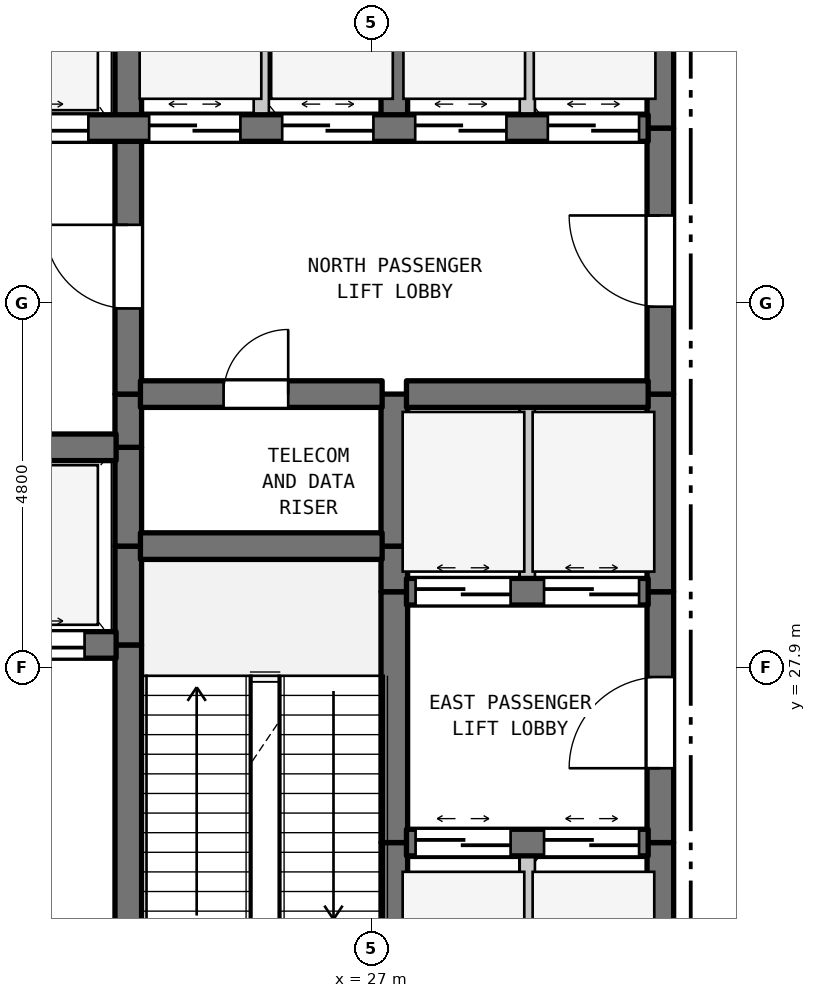
"""IFC4 building model, lengths in metres.
Left out: names, types, materials, properties, quantities, classifications, styles, units other than length and angle.
Written with IfcOpenShell. Run it as: python <this file> out.ifc"""

import sys

from ifc_helpers import new_model, si_unit, direction, frame, frame_2d, origin, place, context, subcontext, project, spatial, rectangle, extrude, element, fill, save


model = new_model("IFC4")
c1 = context("Model", 3, precision=1e-05, world=origin(), true_north=direction((0.0, 1.0)))
c2 = subcontext(c1, "Body", "Model", "MODEL_VIEW")
j1 = project(units=[si_unit("LENGTHUNIT", "METRE"), si_unit("PLANEANGLEUNIT", "RADIAN")], contexts=[c1])
p1 = place(None, origin())
s1 = spatial("IfcSite", under=j1, at=p1, CompositionType="ELEMENT")
p2 = place(p1, origin())
s2 = spatial("IfcBuilding", under=s1, at=p2, CompositionType="ELEMENT")
p3 = place(p2, frame((0.0, 0.0, 81.2)))
s3 = spatial("IfcBuildingStorey", under=s2, at=p3, CompositionType="ELEMENT", Elevation=81.2)
p4 = place(p3, frame((23.8, 22.7, 0.0), z_axis=(0.0, 0.0, 1.0), x_axis=(0.0, 1.0, 0.0)))
e1 = element("IfcWall", 1, at=p4, inside=s3, PredefinedType="SHEAR", context=c2, shape_type="SweptSolid", body=[
    extrude(rectangle(XDim=5.5, YDim=0.35, at=frame_2d((2.75, 0.0))), origin(), (0.0, 0.0, 1.0), 4.885),
])
p5 = place(p4, frame((0.235, 0.0, 0.0)))
e2 = element("IfcOpeningElement", 2, at=p5, cuts=e1, PredefinedType="OPENING", context=c2, shape_type="SweptSolid", body=[
    extrude(rectangle(XDim=1.1, YDim=2.15, at=frame_2d((0.55, 1.075))), frame((0.0, 0.185, 0.0), z_axis=(0.0, -1.0, 0.0), x_axis=(1.0, 0.0, 0.0)), (0.0, 0.0, 1.0), 0.37),
])
for number, where, z_axis, x_axis in (
    (3, (23.8, 28.2, 0.0), (0.0, 0.0, 1.0), (0.0, 1.0, 0.0)),
    (4, (23.8, 29.5, 0.0), (0.0, 0.0, 1.0), (0.0, 1.0, 0.0)),
):
    element("IfcWall", number, at=place(p3, frame(where, z_axis=z_axis, x_axis=x_axis)), inside=s3, PredefinedType="SHEAR", context=c2, shape_type="SweptSolid", body=[
        extrude(rectangle(XDim=1.3, YDim=0.35, at=frame_2d((0.65, 0.0))), origin(), (0.0, 0.0, 1.0), 4.885),
    ])
p6 = place(p3, frame((23.8, 30.8, 0.0), z_axis=(0.0, 0.0, 1.0), x_axis=(0.0, 1.0, 0.0)))
e5 = element("IfcWall", 5, at=p6, inside=s3, PredefinedType="SHEAR", context=c2, shape_type="SweptSolid", body=[
    extrude(rectangle(XDim=0.7, YDim=0.35, at=frame_2d((0.35, 0.0))), origin(), (0.0, 0.0, 1.0), 4.885),
])
p7 = place(p3, frame((23.8, 31.5, 0.0), z_axis=(0.0, 0.0, 1.0), x_axis=(0.0, 1.0, 0.0)))
e6 = element("IfcWall", 6, at=p7, inside=s3, PredefinedType="SHEAR", context=c2, shape_type="SweptSolid", body=[
    extrude(rectangle(XDim=3.5, YDim=0.35, at=frame_2d((1.75, 0.0))), origin(), (0.0, 0.0, 1.0), 4.885),
])
p8 = place(p7, frame((1.127, 0.0, 0.0)))
e7 = element("IfcOpeningElement", 7, at=p8, cuts=e6, PredefinedType="OPENING", context=c2, shape_type="SweptSolid", body=[
    extrude(rectangle(XDim=1.1, YDim=2.15, at=frame_2d((0.55, 1.075))), frame((0.0, 0.185, 0.0), z_axis=(0.0, -1.0, 0.0), x_axis=(1.0, 0.0, 0.0)), (0.0, 0.0, 1.0), 0.37),
])
p9 = place(p3, frame((23.8, 35.0, 0.0), z_axis=(0.0, 0.0, 1.0), x_axis=(0.0, 1.0, 0.0)))
e8 = element("IfcWall", 8, at=p9, inside=s3, PredefinedType="SHEAR", context=c2, shape_type="SweptSolid", body=[
    extrude(rectangle(XDim=2.9, YDim=0.35, at=frame_2d((1.45, 0.0))), origin(), (0.0, 0.0, 1.0), 4.885),
])
p10 = place(p3, frame((25.55, 35.0, 0.0), z_axis=(0.0, 0.0, 1.0), x_axis=(0.0, 1.0, 0.0)))
e9 = element("IfcWall", 9, at=p10, inside=s3, PredefinedType="STANDARD", context=c2, shape_type="SweptSolid", body=[
    extrude(rectangle(XDim=2.9, YDim=0.2, at=frame_2d((1.45, 0.0))), origin(), (0.0, 0.0, 1.0), 4.885),
])
p11 = place(p3, frame((27.3, 22.7, 0.0), z_axis=(0.0, 0.0, 1.0), x_axis=(0.0, 1.0, 0.0)))
e10 = element("IfcWall", 10, at=p11, inside=s3, PredefinedType="SHEAR", context=c2, shape_type="SweptSolid", body=[
    extrude(rectangle(XDim=2.9, YDim=0.35, at=frame_2d((1.45, 0.0))), origin(), (0.0, 0.0, 1.0), 4.885),
])
p12 = place(p3, frame((27.3, 25.6, 0.0), z_axis=(0.0, 0.0, 1.0), x_axis=(0.0, 1.0, 0.0)))
e11 = element("IfcWall", 11, at=p12, inside=s3, PredefinedType="SHEAR", context=c2, shape_type="SweptSolid", body=[
    extrude(rectangle(XDim=3.3, YDim=0.35, at=frame_2d((1.65, 0.0))), origin(), (0.0, 0.0, 1.0), 4.885),
])
p13 = place(p3, frame((27.3, 28.9, 0.0), z_axis=(0.0, 0.0, 1.0), x_axis=(0.0, 1.0, 0.0)))
e12 = element("IfcWall", 12, at=p13, inside=s3, PredefinedType="SHEAR", context=c2, shape_type="SweptSolid", body=[
    extrude(rectangle(XDim=0.6, YDim=0.35, at=frame_2d((0.3, 0.0))), origin(), (0.0, 0.0, 1.0), 4.885),
])
p14 = place(p3, frame((27.3, 29.5, 0.0), z_axis=(0.0, 0.0, 1.0), x_axis=(0.0, 1.0, 0.0)))
e13 = element("IfcWall", 13, at=p14, inside=s3, PredefinedType="SHEAR", context=c2, shape_type="SweptSolid", body=[
    extrude(rectangle(XDim=2.0, YDim=0.35, at=frame_2d((1.0, 0.0))), origin(), (0.0, 0.0, 1.0), 4.885),
])
p15 = place(p3, frame((27.3, 35.0, 0.0), z_axis=(0.0, 0.0, 1.0), x_axis=(0.0, 1.0, 0.0)))
e14 = element("IfcWall", 14, at=p15, inside=s3, PredefinedType="SHEAR", context=c2, shape_type="SweptSolid", body=[
    extrude(rectangle(XDim=2.9, YDim=0.35, at=frame_2d((1.45, 0.0))), origin(), (0.0, 0.0, 1.0), 4.885),
])
p16 = place(p3, frame((29.05, 22.7, 0.0), z_axis=(0.0, 0.0, 1.0), x_axis=(0.0, 1.0, 0.0)))
e15 = element("IfcWall", 15, at=p16, inside=s3, PredefinedType="STANDARD", context=c2, shape_type="SweptSolid", body=[
    extrude(rectangle(XDim=2.9, YDim=0.2, at=frame_2d((1.45, 0.0))), origin(), (0.0, 0.0, 1.0), 4.885),
])
p17 = place(p3, frame((29.05, 28.9, 0.0), z_axis=(0.0, 0.0, 1.0), x_axis=(0.0, 1.0, 0.0)))
e16 = element("IfcWall", 16, at=p17, inside=s3, PredefinedType="STANDARD", context=c2, shape_type="SweptSolid", body=[
    extrude(rectangle(XDim=2.6, YDim=0.2, at=frame_2d((1.3, 0.0))), origin(), (0.0, 0.0, 1.0), 4.885),
])
p18 = place(p3, frame((29.05, 35.0, 0.0), z_axis=(0.0, 0.0, 1.0), x_axis=(0.0, 1.0, 0.0)))
e17 = element("IfcWall", 17, at=p18, inside=s3, PredefinedType="STANDARD", context=c2, shape_type="SweptSolid", body=[
    extrude(rectangle(XDim=2.9, YDim=0.2, at=frame_2d((1.45, 0.0))), origin(), (0.0, 0.0, 1.0), 4.885),
])
p19 = place(p3, frame((30.8, 22.7, 0.0), z_axis=(0.0, 0.0, 1.0), x_axis=(0.0, 1.0, 0.0)))
e18 = element("IfcWall", 18, at=p19, inside=s3, PredefinedType="SHEAR", context=c2, shape_type="SweptSolid", body=[
    extrude(rectangle(XDim=2.9, YDim=0.35, at=frame_2d((1.45, 0.0))), origin(), (0.0, 0.0, 1.0), 4.885),
])
p20 = place(p3, frame((30.8, 25.6, 0.0), z_axis=(0.0, 0.0, 1.0), x_axis=(0.0, 1.0, 0.0)))
e19 = element("IfcWall", 19, at=p20, inside=s3, PredefinedType="SHEAR", context=c2, shape_type="SweptSolid", body=[
    extrude(rectangle(XDim=3.3, YDim=0.35, at=frame_2d((1.65, 0.0))), origin(), (0.0, 0.0, 1.0), 4.885),
])
p21 = place(p20, frame((0.978, 0.0, 0.0)))
e20 = element("IfcOpeningElement", 20, at=p21, cuts=e19, PredefinedType="OPENING", context=c2, shape_type="SweptSolid", body=[
    extrude(rectangle(XDim=1.2, YDim=2.2, at=frame_2d((0.6, 1.1))), frame((0.0, 0.185, 0.0), z_axis=(0.0, -1.0, 0.0), x_axis=(1.0, 0.0, 0.0)), (0.0, 0.0, 1.0), 0.37),
])
p22 = place(p3, frame((30.8, 28.9, 0.0), z_axis=(0.0, 0.0, 1.0), x_axis=(0.0, 1.0, 0.0)))
e21 = element("IfcWall", 21, at=p22, inside=s3, PredefinedType="SHEAR", context=c2, shape_type="SweptSolid", body=[
    extrude(rectangle(XDim=2.6, YDim=0.35, at=frame_2d((1.3, 0.0))), origin(), (0.0, 0.0, 1.0), 4.885),
])
p23 = place(p3, frame((30.8, 31.5, 0.0), z_axis=(0.0, 0.0, 1.0), x_axis=(0.0, 1.0, 0.0)))
e22 = element("IfcWall", 22, at=p23, inside=s3, PredefinedType="SHEAR", context=c2, shape_type="SweptSolid", body=[
    extrude(rectangle(XDim=3.5, YDim=0.35, at=frame_2d((1.75, 0.0))), origin(), (0.0, 0.0, 1.0), 4.885),
])
p24 = place(p23, frame((1.15, 0.0, 0.0)))
e23 = element("IfcOpeningElement", 23, at=p24, cuts=e22, PredefinedType="OPENING", context=c2, shape_type="SweptSolid", body=[
    extrude(rectangle(XDim=1.2, YDim=2.2, at=frame_2d((0.6, 1.1))), frame((0.0, 0.185, 0.0), z_axis=(0.0, -1.0, 0.0), x_axis=(1.0, 0.0, 0.0)), (0.0, 0.0, 1.0), 0.37),
])
p25 = place(p3, frame((30.8, 35.0, 0.0), z_axis=(0.0, 0.0, 1.0), x_axis=(0.0, 1.0, 0.0)))
e24 = element("IfcWall", 24, at=p25, inside=s3, PredefinedType="SHEAR", context=c2, shape_type="SweptSolid", body=[
    extrude(rectangle(XDim=2.9, YDim=0.35, at=frame_2d((1.45, 0.0))), origin(), (0.0, 0.0, 1.0), 4.885),
])
p26 = place(p3, frame((27.46, 25.6, 0.0), z_axis=(0.0, 0.0, 1.0), x_axis=(1.0, 0.0, 0.0)))
e25 = element("IfcWall", 25, at=p26, inside=s3, PredefinedType="SHEAR", context=c2, shape_type="SweptSolid", body=[
    extrude(rectangle(XDim=3.18, YDim=0.35, at=frame_2d((1.59, 0.0))), origin(), (0.0, 0.0, 1.0), 4.885),
])
p27 = place(p26, frame((0.12, 0.0, 0.0)))
e26 = element("IfcOpeningElement", 26, at=p27, cuts=e25, PredefinedType="OPENING", context=c2, shape_type="SweptSolid", body=[
    extrude(rectangle(XDim=1.25, YDim=2.2, at=frame_2d((0.625, 1.1))), frame((0.0, 0.185, 0.0), z_axis=(0.0, -1.0, 0.0), x_axis=(1.0, 0.0, 0.0)), (0.0, 0.0, 1.0), 0.37),
])
p28 = place(p26, frame((1.81, 0.0, 0.0)))
e27 = element("IfcOpeningElement", 27, at=p28, cuts=e25, PredefinedType="OPENING", context=c2, shape_type="SweptSolid", body=[
    extrude(rectangle(XDim=1.25, YDim=2.2, at=frame_2d((0.625, 1.1))), frame((0.0, 0.185, 0.0), z_axis=(0.0, -1.0, 0.0), x_axis=(1.0, 0.0, 0.0)), (0.0, 0.0, 1.0), 0.37),
])
p29 = place(p3, frame((19.16, 28.2, 0.0), z_axis=(0.0, 0.0, 1.0), x_axis=(1.0, 0.0, 0.0)))
e28 = element("IfcWall", 28, at=p29, inside=s3, PredefinedType="SHEAR", context=c2, shape_type="SweptSolid", body=[
    extrude(rectangle(XDim=4.48, YDim=0.35, at=frame_2d((2.24, 0.0))), origin(), (0.0, 0.0, 1.0), 4.885),
])
p30 = place(p29, frame((0.415, 0.0, 0.0)))
e29 = element("IfcOpeningElement", 29, at=p30, cuts=e28, PredefinedType="OPENING", context=c2, shape_type="SweptSolid", body=[
    extrude(rectangle(XDim=1.25, YDim=2.2, at=frame_2d((0.625, 1.1))), frame((0.0, 0.185, 0.0), z_axis=(0.0, -1.0, 0.0), x_axis=(1.0, 0.0, 0.0)), (0.0, 0.0, 1.0), 0.37),
])
p31 = place(p29, frame((2.815, 0.0, 0.0)))
e30 = element("IfcOpeningElement", 30, at=p31, cuts=e28, PredefinedType="OPENING", context=c2, shape_type="SweptSolid", body=[
    extrude(rectangle(XDim=1.25, YDim=2.2, at=frame_2d((0.625, 1.1))), frame((0.0, 0.185, 0.0), z_axis=(0.0, -1.0, 0.0), x_axis=(1.0, 0.0, 0.0)), (0.0, 0.0, 1.0), 0.37),
])
p32 = place(p3, frame((27.46, 28.9, 0.0), z_axis=(0.0, 0.0, 1.0), x_axis=(1.0, 0.0, 0.0)))
e31 = element("IfcWall", 31, at=p32, inside=s3, PredefinedType="SHEAR", context=c2, shape_type="SweptSolid", body=[
    extrude(rectangle(XDim=3.18, YDim=0.35, at=frame_2d((1.59, 0.0))), origin(), (0.0, 0.0, 1.0), 4.885),
])
p33 = place(p32, frame((0.12, 0.0, 0.0)))
e32 = element("IfcOpeningElement", 32, at=p33, cuts=e31, PredefinedType="OPENING", context=c2, shape_type="SweptSolid", body=[
    extrude(rectangle(XDim=1.25, YDim=2.2, at=frame_2d((0.625, 1.1))), frame((0.0, 0.185, 0.0), z_axis=(0.0, -1.0, 0.0), x_axis=(1.0, 0.0, 0.0)), (0.0, 0.0, 1.0), 0.37),
])
p34 = place(p32, frame((1.81, 0.0, 0.0)))
e33 = element("IfcOpeningElement", 33, at=p34, cuts=e31, PredefinedType="OPENING", context=c2, shape_type="SweptSolid", body=[
    extrude(rectangle(XDim=1.25, YDim=2.2, at=frame_2d((0.625, 1.1))), frame((0.0, 0.185, 0.0), z_axis=(0.0, -1.0, 0.0), x_axis=(1.0, 0.0, 0.0)), (0.0, 0.0, 1.0), 0.37),
])
p35 = place(p3, frame((23.96, 29.5, 0.0), z_axis=(0.0, 0.0, 1.0), x_axis=(1.0, 0.0, 0.0)))
e34 = element("IfcWall", 34, at=p35, inside=s3, PredefinedType="SHEAR", context=c2, shape_type="SweptSolid", body=[
    extrude(rectangle(XDim=3.18, YDim=0.35, at=frame_2d((1.59, 0.0))), origin(), (0.0, 0.0, 1.0), 4.885),
])
p36 = place(p3, frame((19.16, 30.8, 0.0), z_axis=(0.0, 0.0, 1.0), x_axis=(1.0, 0.0, 0.0)))
e35 = element("IfcWall", 35, at=p36, inside=s3, PredefinedType="SHEAR", context=c2, shape_type="SweptSolid", body=[
    extrude(rectangle(XDim=4.48, YDim=0.35, at=frame_2d((2.24, 0.0))), origin(), (0.0, 0.0, 1.0), 4.885),
])
p37 = place(p3, frame((23.96, 31.5, 0.0), z_axis=(0.0, 0.0, 1.0), x_axis=(1.0, 0.0, 0.0)))
e36 = element("IfcWall", 36, at=p37, inside=s3, PredefinedType="SHEAR", context=c2, shape_type="SweptSolid", body=[
    extrude(rectangle(XDim=3.18, YDim=0.35, at=frame_2d((1.59, 0.0))), origin(), (0.0, 0.0, 1.0), 4.885),
])
p38 = place(p37, frame((1.094, 0.0, 0.0)))
e37 = element("IfcOpeningElement", 37, at=p38, cuts=e36, PredefinedType="OPENING", context=c2, shape_type="SweptSolid", body=[
    extrude(rectangle(XDim=0.85, YDim=2.1, at=frame_2d((0.425, 1.05))), frame((0.0, 0.185, 0.0), z_axis=(0.0, -1.0, 0.0), x_axis=(1.0, 0.0, 0.0)), (0.0, 0.0, 1.0), 0.37),
])
p39 = place(p3, frame((27.46, 31.5, 0.0), z_axis=(0.0, 0.0, 1.0), x_axis=(1.0, 0.0, 0.0)))
e38 = element("IfcWall", 38, at=p39, inside=s3, PredefinedType="SHEAR", context=c2, shape_type="SweptSolid", body=[
    extrude(rectangle(XDim=3.18, YDim=0.35, at=frame_2d((1.59, 0.0))), origin(), (0.0, 0.0, 1.0), 4.885),
])
p40 = place(p3, frame((19.16, 35.0, 0.0), z_axis=(0.0, 0.0, 1.0), x_axis=(1.0, 0.0, 0.0)))
e39 = element("IfcWall", 39, at=p40, inside=s3, PredefinedType="SHEAR", context=c2, shape_type="SweptSolid", body=[
    extrude(rectangle(XDim=11.48, YDim=0.35, at=frame_2d((5.74, 0.0))), origin(), (0.0, 0.0, 1.0), 4.885),
])
p41 = place(p40, frame((0.365, 0.0, 0.0)))
e40 = element("IfcOpeningElement", 40, at=p41, cuts=e39, PredefinedType="OPENING", context=c2, shape_type="SweptSolid", body=[
    extrude(rectangle(XDim=1.35, YDim=2.2, at=frame_2d((0.675, 1.1))), frame((0.0, 0.185, 0.0), z_axis=(0.0, -1.0, 0.0), x_axis=(1.0, 0.0, 0.0)), (0.0, 0.0, 1.0), 0.37),
])
p42 = place(p40, frame((2.765, 0.0, 0.0)))
e41 = element("IfcOpeningElement", 41, at=p42, cuts=e39, PredefinedType="OPENING", context=c2, shape_type="SweptSolid", body=[
    extrude(rectangle(XDim=1.35, YDim=2.2, at=frame_2d((0.675, 1.1))), frame((0.0, 0.185, 0.0), z_axis=(0.0, -1.0, 0.0), x_axis=(1.0, 0.0, 0.0)), (0.0, 0.0, 1.0), 0.37),
])
p43 = place(p40, frame((4.915, 0.0, 0.0)))
e42 = element("IfcOpeningElement", 42, at=p43, cuts=e39, PredefinedType="OPENING", context=c2, shape_type="SweptSolid", body=[
    extrude(rectangle(XDim=1.2, YDim=2.2, at=frame_2d((0.6, 1.1))), frame((0.0, 0.185, 0.0), z_axis=(0.0, -1.0, 0.0), x_axis=(1.0, 0.0, 0.0)), (0.0, 0.0, 1.0), 0.37),
])
p44 = place(p40, frame((6.665, 0.0, 0.0)))
e43 = element("IfcOpeningElement", 43, at=p44, cuts=e39, PredefinedType="OPENING", context=c2, shape_type="SweptSolid", body=[
    extrude(rectangle(XDim=1.2, YDim=2.2, at=frame_2d((0.6, 1.1))), frame((0.0, 0.185, 0.0), z_axis=(0.0, -1.0, 0.0), x_axis=(1.0, 0.0, 0.0)), (0.0, 0.0, 1.0), 0.37),
])
p45 = place(p40, frame((8.415, 0.0, 0.0)))
e44 = element("IfcOpeningElement", 44, at=p45, cuts=e39, PredefinedType="OPENING", context=c2, shape_type="SweptSolid", body=[
    extrude(rectangle(XDim=1.2, YDim=2.2, at=frame_2d((0.6, 1.1))), frame((0.0, 0.185, 0.0), z_axis=(0.0, -1.0, 0.0), x_axis=(1.0, 0.0, 0.0)), (0.0, 0.0, 1.0), 0.37),
])
p46 = place(p40, frame((10.16, 0.0, 0.0)))
e45 = element("IfcOpeningElement", 45, at=p46, cuts=e39, PredefinedType="OPENING", context=c2, shape_type="SweptSolid", body=[
    extrude(rectangle(XDim=1.2, YDim=2.2, at=frame_2d((0.6, 1.1))), frame((0.0, 0.185, 0.0), z_axis=(0.0, -1.0, 0.0), x_axis=(1.0, 0.0, 0.0)), (0.0, 0.0, 1.0), 0.37),
])
p47 = place(p8, origin())
e46 = element("IfcDoor", 46, at=p47, inside=s3, OperationType="SINGLE_SWING_RIGHT", PredefinedType="DOOR", context=c2, shape_type="SweptSolid", body=[
    extrude(rectangle(XDim=1.1, YDim=2.15, at=frame_2d((0.55, 1.075))), frame((0.0, 0.025, 0.0), z_axis=(0.0, -1.0, 0.0), x_axis=(1.0, 0.0, 0.0)), (0.0, 0.0, 1.0), 0.05),
])
fill(e7, e46)
p48 = place(p21, origin())
e47 = element("IfcDoor", 47, at=p48, inside=s3, OperationType="SINGLE_SWING_LEFT", PredefinedType="DOOR", context=c2, shape_type="SweptSolid", body=[
    extrude(rectangle(XDim=1.2, YDim=2.2, at=frame_2d((0.6, 1.1))), frame((0.0, 0.025, 0.0), z_axis=(0.0, -1.0, 0.0), x_axis=(1.0, 0.0, 0.0)), (0.0, 0.0, 1.0), 0.05),
])
fill(e20, e47)
p49 = place(p24, origin())
e48 = element("IfcDoor", 48, at=p49, inside=s3, OperationType="SINGLE_SWING_RIGHT", PredefinedType="DOOR", context=c2, shape_type="SweptSolid", body=[
    extrude(rectangle(XDim=1.2, YDim=2.2, at=frame_2d((0.6, 1.1))), frame((0.0, 0.025, 0.0), z_axis=(0.0, -1.0, 0.0), x_axis=(1.0, 0.0, 0.0)), (0.0, 0.0, 1.0), 0.05),
])
fill(e23, e48)
p50 = place(p27, origin())
e49 = element("IfcDoor", 49, at=p50, inside=s3, OperationType="DOUBLE_DOOR_SLIDING", PredefinedType="DOOR", context=c2, shape_type="SweptSolid", body=[
    extrude(rectangle(XDim=1.25, YDim=2.2, at=frame_2d((0.625, 1.1))), frame((0.0, 0.025, 0.0), z_axis=(0.0, -1.0, 0.0), x_axis=(1.0, 0.0, 0.0)), (0.0, 0.0, 1.0), 0.05),
])
fill(e26, e49)
p51 = place(p28, origin())
e50 = element("IfcDoor", 50, at=p51, inside=s3, OperationType="DOUBLE_DOOR_SLIDING", PredefinedType="DOOR", context=c2, shape_type="SweptSolid", body=[
    extrude(rectangle(XDim=1.25, YDim=2.2, at=frame_2d((0.625, 1.1))), frame((0.0, 0.025, 0.0), z_axis=(0.0, -1.0, 0.0), x_axis=(1.0, 0.0, 0.0)), (0.0, 0.0, 1.0), 0.05),
])
fill(e27, e50)
p52 = place(p31, origin())
e51 = element("IfcDoor", 51, at=p52, inside=s3, OperationType="DOUBLE_DOOR_SLIDING", PredefinedType="DOOR", context=c2, shape_type="SweptSolid", body=[
    extrude(rectangle(XDim=1.25, YDim=2.2, at=frame_2d((0.625, 1.1))), frame((0.0, 0.025, 0.0), z_axis=(0.0, -1.0, 0.0), x_axis=(1.0, 0.0, 0.0)), (0.0, 0.0, 1.0), 0.05),
])
fill(e30, e51)
p53 = place(p33, origin())
e52 = element("IfcDoor", 52, at=p53, inside=s3, OperationType="DOUBLE_DOOR_SLIDING", PredefinedType="DOOR", context=c2, shape_type="SweptSolid", body=[
    extrude(rectangle(XDim=1.25, YDim=2.2, at=frame_2d((0.625, 1.1))), frame((0.0, 0.025, 0.0), z_axis=(0.0, -1.0, 0.0), x_axis=(1.0, 0.0, 0.0)), (0.0, 0.0, 1.0), 0.05),
])
fill(e32, e52)
p54 = place(p34, origin())
e53 = element("IfcDoor", 53, at=p54, inside=s3, OperationType="DOUBLE_DOOR_SLIDING", PredefinedType="DOOR", context=c2, shape_type="SweptSolid", body=[
    extrude(rectangle(XDim=1.25, YDim=2.2, at=frame_2d((0.625, 1.1))), frame((0.0, 0.025, 0.0), z_axis=(0.0, -1.0, 0.0), x_axis=(1.0, 0.0, 0.0)), (0.0, 0.0, 1.0), 0.05),
])
fill(e33, e53)
p55 = place(p38, origin())
e54 = element("IfcDoor", 54, at=p55, inside=s3, OperationType="SINGLE_SWING_RIGHT", PredefinedType="DOOR", context=c2, shape_type="SweptSolid", body=[
    extrude(rectangle(XDim=0.85, YDim=2.1, at=frame_2d((0.425, 1.05))), frame((0.0, 0.025, 0.0), z_axis=(0.0, -1.0, 0.0), x_axis=(1.0, 0.0, 0.0)), (0.0, 0.0, 1.0), 0.05),
])
fill(e37, e54)
p56 = place(p42, origin())
e55 = element("IfcDoor", 55, at=p56, inside=s3, OperationType="DOUBLE_DOOR_SLIDING", PredefinedType="DOOR", context=c2, shape_type="SweptSolid", body=[
    extrude(rectangle(XDim=1.35, YDim=2.2, at=frame_2d((0.675, 1.1))), frame((0.0, 0.025, 0.0), z_axis=(0.0, -1.0, 0.0), x_axis=(1.0, 0.0, 0.0)), (0.0, 0.0, 1.0), 0.05),
])
fill(e41, e55)
p57 = place(p43, origin())
e56 = element("IfcDoor", 56, at=p57, inside=s3, OperationType="DOUBLE_DOOR_SLIDING", PredefinedType="DOOR", context=c2, shape_type="SweptSolid", body=[
    extrude(rectangle(XDim=1.2, YDim=2.2, at=frame_2d((0.6, 1.1))), frame((0.0, 0.025, 0.0), z_axis=(0.0, -1.0, 0.0), x_axis=(1.0, 0.0, 0.0)), (0.0, 0.0, 1.0), 0.05),
])
fill(e42, e56)
p58 = place(p44, origin())
e57 = element("IfcDoor", 57, at=p58, inside=s3, OperationType="DOUBLE_DOOR_SLIDING", PredefinedType="DOOR", context=c2, shape_type="SweptSolid", body=[
    extrude(rectangle(XDim=1.2, YDim=2.2, at=frame_2d((0.6, 1.1))), frame((0.0, 0.025, 0.0), z_axis=(0.0, -1.0, 0.0), x_axis=(1.0, 0.0, 0.0)), (0.0, 0.0, 1.0), 0.05),
])
fill(e43, e57)
p59 = place(p45, origin())
e58 = element("IfcDoor", 58, at=p59, inside=s3, OperationType="DOUBLE_DOOR_SLIDING", PredefinedType="DOOR", context=c2, shape_type="SweptSolid", body=[
    extrude(rectangle(XDim=1.2, YDim=2.2, at=frame_2d((0.6, 1.1))), frame((0.0, 0.025, 0.0), z_axis=(0.0, -1.0, 0.0), x_axis=(1.0, 0.0, 0.0)), (0.0, 0.0, 1.0), 0.05),
])
fill(e44, e58)
p60 = place(p46, origin())
e59 = element("IfcDoor", 59, at=p60, inside=s3, OperationType="DOUBLE_DOOR_SLIDING", PredefinedType="DOOR", context=c2, shape_type="SweptSolid", body=[
    extrude(rectangle(XDim=1.2, YDim=2.2, at=frame_2d((0.6, 1.1))), frame((0.0, 0.025, 0.0), z_axis=(0.0, -1.0, 0.0), x_axis=(1.0, 0.0, 0.0)), (0.0, 0.0, 1.0), 0.05),
])
fill(e45, e59)
save(model, sys.argv[1])
